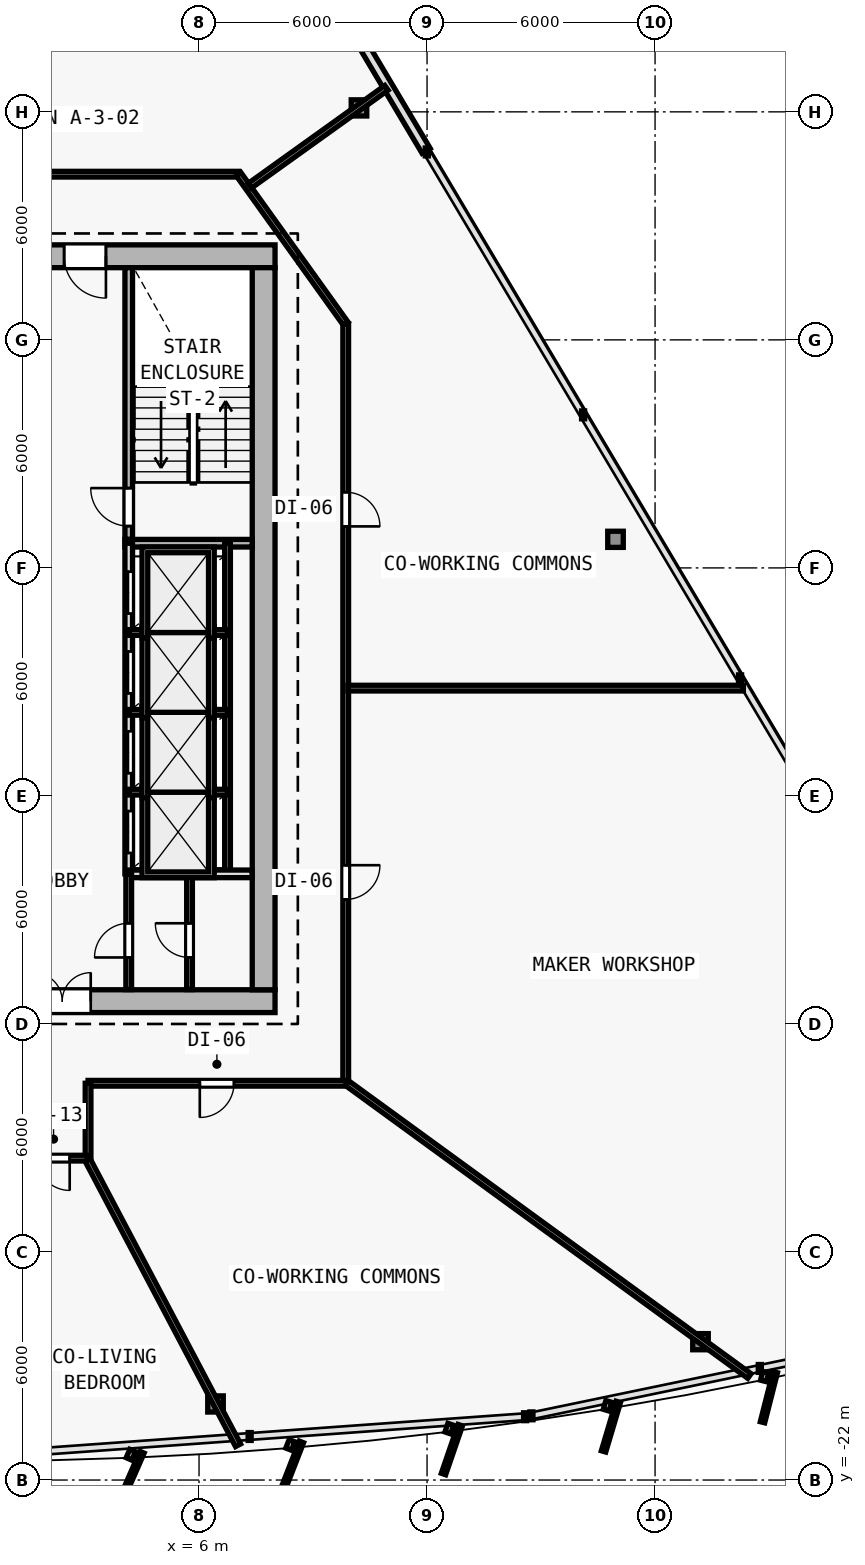
"""IFC4 building model, lengths in metres.
Left out: names, types, materials, properties, quantities, classifications, styles, units other than length and angle.
Written with IfcOpenShell. Run it as: python <this file> out.ifc"""

import sys

from ifc_helpers import new_model, si_unit, direction, frame, frame_2d, origin, origin_2d, place, context, subcontext, project, spatial, rectangle, i_section, extrude, element, fill, save


model = new_model("IFC4")
c1 = context("Model", 3, precision=1e-05, world=origin(), true_north=direction((0.0, 1.0)))
c2 = subcontext(c1, "Body", "Model", "MODEL_VIEW")
j1 = project(units=[si_unit("LENGTHUNIT", "METRE"), si_unit("PLANEANGLEUNIT", "RADIAN")], contexts=[c1])
p1 = place(None, origin())
s1 = spatial("IfcSite", under=j1, at=p1, CompositionType="ELEMENT")
p2 = place(p1, origin())
s2 = spatial("IfcBuilding", under=s1, at=p2, CompositionType="ELEMENT")
p3 = place(p2, frame((0.0, 0.0, 86.1)))
s3 = spatial("IfcBuildingStorey", under=s2, at=p3, CompositionType="ELEMENT", Elevation=86.1)
for number, where, z_axis, x_axis in (
    (1, (7.7, -9.4, 0.0), (0.0, 0.0, 1.0), (1.0, 0.0, 0.0)),
    (2, (7.7, 10.2, 0.0), (0.0, 0.0, 1.0), (1.0, 0.0, 0.0)),
    (3, (7.7, 0.4, 0.0), (0.0, 0.0, 1.0), (1.0, 0.0, 0.0)),
):
    element("IfcColumn", number, at=place(p3, frame(where, z_axis=z_axis, x_axis=x_axis)), inside=s3, PredefinedType="COLUMN", context=c2, shape_type="SweptSolid", body=[
        extrude(i_section(OverallWidth=0.409, OverallDepth=0.425, WebThickness=0.021, FlangeThickness=0.034, FilletRadius=0.015, at=origin_2d()), origin(), (0.0, 0.0, 1.0), 3.6),
    ])
p4 = place(p3, frame((6.433, -19.998, 0.005), z_axis=(-0.006865858153, 0.03521301508, 0.99935624457), x_axis=(-0.981516643497, -0.191376797284, 0.0)))
e4 = element("IfcColumn", 4, at=p4, inside=s3, PredefinedType="COLUMN", context=c2, shape_type="SweptSolid", body=[
    extrude(i_section(OverallWidth=0.409, OverallDepth=0.425, WebThickness=0.021, FlangeThickness=0.034, FilletRadius=0.015, at=origin_2d()), origin(), (0.0, 0.0, 1.0), 3.591),
])
p5 = place(p3, frame((19.195, -18.36, 0.005), z_axis=(-0.020594893987, 0.033509183946, 0.999226193078), x_axis=(-0.851954850327, -0.523615252838, 0.0)))
e5 = element("IfcColumn", 5, at=p5, inside=s3, PredefinedType="COLUMN", context=c2, shape_type="SweptSolid", body=[
    extrude(i_section(OverallWidth=0.409, OverallDepth=0.425, WebThickness=0.021, FlangeThickness=0.034, FilletRadius=0.015, at=origin_2d()), origin(), (0.0, 0.0, 1.0), 3.592),
])
p6 = place(p3, frame((16.959, 2.752, 0.005), z_axis=(-0.018906028715, 0.009589028952, 0.999775281052), x_axis=(-0.452339157861, -0.891845999187, 0.0)))
e6 = element("IfcColumn", 6, at=p6, inside=s3, PredefinedType="COLUMN", context=c2, shape_type="SweptSolid", body=[
    extrude(i_section(OverallWidth=0.409, OverallDepth=0.425, WebThickness=0.021, FlangeThickness=0.034, FilletRadius=0.015, at=origin_2d()), origin(), (0.0, 0.0, 1.0), 3.59),
])
p7 = place(p3, frame((10.209, 14.104, 0.005), z_axis=(-0.011699044583, -0.00258467264, 0.999928223336), x_axis=(0.215728093413, -0.976453475447, 0.0)))
e7 = element("IfcColumn", 7, at=p7, inside=s3, PredefinedType="COLUMN", context=c2, shape_type="SweptSolid", body=[
    extrude(i_section(OverallWidth=0.409, OverallDepth=0.425, WebThickness=0.021, FlangeThickness=0.034, FilletRadius=0.015, at=origin_2d()), origin(), (0.0, 0.0, 1.0), 3.589),
])
p8 = place(p3, frame((6.172, 22.734, 0.0), z_axis=(0.0, 0.0, 1.0), x_axis=(0.511105869751, -0.859517765905, 0.0)))
e8 = element("IfcWall", 8, at=p8, inside=s3, PredefinedType="SOLIDWALL", context=c2, shape_type="SweptSolid", body=[
    extrude(rectangle(XDim=11.357, YDim=0.25, at=frame_2d((5.678, 0.0))), origin(), (0.0, 0.0, 1.0), 3.35),
])
p9 = place(p8, frame((5.229, 0.0, 0.62)))
e9 = element("IfcOpeningElement", 9, at=p9, cuts=e8, PredefinedType="OPENING", context=c2, shape_type="SweptSolid", body=[
    extrude(rectangle(XDim=0.9, YDim=1.6, at=frame_2d((0.45, 0.8))), frame((0.0, 0.135, 0.0), z_axis=(0.0, -1.0, 0.0), x_axis=(1.0, 0.0, 0.0)), (0.0, 0.0, 1.0), 0.27),
])
p10 = place(p3, frame((-8.0, -9.4, 0.0), z_axis=(0.0, 0.0, 1.0), x_axis=(1.0, 0.0, 0.0)))
e10 = element("IfcWall", 10, at=p10, inside=s3, PredefinedType="SHEAR", context=c2, shape_type="SweptSolid", body=[
    extrude(rectangle(XDim=16.0, YDim=0.6, at=frame_2d((8.0, 0.0))), origin(), (0.0, 0.0, 1.0), 3.35),
])
p11 = place(p10, frame((9.65, 0.0, 0.0)))
e11 = element("IfcOpeningElement", 11, at=p11, cuts=e10, PredefinedType="OPENING", context=c2, shape_type="SweptSolid", body=[
    extrude(rectangle(XDim=1.5, YDim=2.2, at=frame_2d((0.75, 1.1))), frame((0.0, 0.31, 0.0), z_axis=(0.0, -1.0, 0.0), x_axis=(1.0, 0.0, 0.0)), (0.0, 0.0, 1.0), 0.62),
])
p12 = place(p3, frame((8.0, 10.2, 0.0), z_axis=(0.0, 0.0, 1.0), x_axis=(-1.0, 0.0, 0.0)))
e12 = element("IfcWall", 12, at=p12, inside=s3, PredefinedType="SHEAR", context=c2, shape_type="SweptSolid", body=[
    extrude(rectangle(XDim=16.0, YDim=0.6, at=frame_2d((8.0, 0.0))), origin(), (0.0, 0.0, 1.0), 3.35),
])
p13 = place(p12, frame((4.45, 0.0, 0.0)))
e13 = element("IfcOpeningElement", 13, at=p13, cuts=e12, PredefinedType="OPENING", context=c2, shape_type="SweptSolid", body=[
    extrude(rectangle(XDim=1.1, YDim=2.15, at=frame_2d((0.55, 1.075))), frame((0.0, 0.31, 0.0), z_axis=(0.0, -1.0, 0.0), x_axis=(1.0, 0.0, 0.0)), (0.0, 0.0, 1.0), 0.62),
])
p14 = place(p3, frame((7.7, 9.9, 0.0), z_axis=(0.0, 0.0, 1.0), x_axis=(0.0, -1.0, 0.0)))
e14 = element("IfcWall", 14, at=p14, inside=s3, PredefinedType="SHEAR", context=c2, shape_type="SweptSolid", body=[
    extrude(rectangle(XDim=19.0, YDim=0.6, at=frame_2d((9.5, 0.0))), origin(), (0.0, 0.0, 1.0), 3.35),
])
p15 = place(p3, frame((4.15, 2.75, 0.0), z_axis=(0.0, 0.0, 1.0), x_axis=(0.0, 1.0, 0.0)))
e15 = element("IfcWall", 15, at=p15, inside=s3, PredefinedType="SOLIDWALL", context=c2, shape_type="SweptSolid", body=[
    extrude(rectangle(XDim=7.15, YDim=0.2, at=frame_2d((3.575, 0.0))), origin(), (0.0, 0.0, 1.0), 3.35),
])
p16 = place(p15, frame((0.35, 0.0, 0.0)))
e16 = element("IfcOpeningElement", 16, at=p16, cuts=e15, PredefinedType="OPENING", context=c2, shape_type="SweptSolid", body=[
    extrude(rectangle(XDim=1.0, YDim=2.15, at=frame_2d((0.5, 1.075))), frame((0.0, 0.11, 0.0), z_axis=(0.0, -1.0, 0.0), x_axis=(1.0, 0.0, 0.0)), (0.0, 0.0, 1.0), 0.22),
])
p17 = place(p3, frame((4.05, 2.65, 0.0), z_axis=(0.0, 0.0, 1.0), x_axis=(1.0, 0.0, 0.0)))
e17 = element("IfcWall", 17, at=p17, inside=s3, PredefinedType="SOLIDWALL", context=c2, shape_type="SweptSolid", body=[
    extrude(rectangle(XDim=3.35, YDim=0.2, at=frame_2d((1.675, 0.0))), origin(), (0.0, 0.0, 1.0), 3.35),
])
p18 = place(p3, frame((4.15, -6.05, 0.0), z_axis=(0.0, 0.0, 1.0), x_axis=(0.0, 1.0, 0.0)))
e18 = element("IfcWall", 18, at=p18, inside=s3, PredefinedType="SOLIDWALL", context=c2, shape_type="SweptSolid", body=[
    extrude(rectangle(XDim=8.7, YDim=0.2, at=frame_2d((4.35, 0.0))), origin(), (0.0, 0.0, 1.0), 3.35),
])
p19 = place(p18, frame((0.55, 0.0, 0.0)))
e19 = element("IfcOpeningElement", 19, at=p19, cuts=e18, PredefinedType="OPENING", context=c2, shape_type="SweptSolid", body=[
    extrude(rectangle(XDim=1.1, YDim=2.15, at=frame_2d((0.55, 1.075))), frame((0.0, 0.11, 0.0), z_axis=(0.0, -1.0, 0.0), x_axis=(1.0, 0.0, 0.0)), (0.0, 0.0, 1.0), 0.22),
])
p20 = place(p18, frame((2.65, 0.0, 0.0)))
e20 = element("IfcOpeningElement", 20, at=p20, cuts=e18, PredefinedType="OPENING", context=c2, shape_type="SweptSolid", body=[
    extrude(rectangle(XDim=1.1, YDim=2.15, at=frame_2d((0.55, 1.075))), frame((0.0, 0.11, 0.0), z_axis=(0.0, -1.0, 0.0), x_axis=(1.0, 0.0, 0.0)), (0.0, 0.0, 1.0), 0.22),
])
p21 = place(p18, frame((4.75, 0.0, 0.0)))
e21 = element("IfcOpeningElement", 21, at=p21, cuts=e18, PredefinedType="OPENING", context=c2, shape_type="SweptSolid", body=[
    extrude(rectangle(XDim=1.1, YDim=2.15, at=frame_2d((0.55, 1.075))), frame((0.0, 0.11, 0.0), z_axis=(0.0, -1.0, 0.0), x_axis=(1.0, 0.0, 0.0)), (0.0, 0.0, 1.0), 0.22),
])
p22 = place(p18, frame((6.85, 0.0, 0.0)))
e22 = element("IfcOpeningElement", 22, at=p22, cuts=e18, PredefinedType="OPENING", context=c2, shape_type="SweptSolid", body=[
    extrude(rectangle(XDim=1.1, YDim=2.15, at=frame_2d((0.55, 1.075))), frame((0.0, 0.11, 0.0), z_axis=(0.0, -1.0, 0.0), x_axis=(1.0, 0.0, 0.0)), (0.0, 0.0, 1.0), 0.22),
])
p23 = place(p3, frame((6.75, -6.05, 0.0), z_axis=(0.0, 0.0, 1.0), x_axis=(0.0, 1.0, 0.0)))
e23 = element("IfcWall", 23, at=p23, inside=s3, PredefinedType="PARTITIONING", context=c2, shape_type="SweptSolid", body=[
    extrude(rectangle(XDim=8.7, YDim=0.15, at=frame_2d((4.35, 0.0))), origin(), (0.0, 0.0, 1.0), 3.35),
])
for number, where, z_axis, x_axis in (
    (24, (4.15, -3.9, 0.0), (0.0, 0.0, 1.0), (1.0, 0.0, 0.0)),
    (25, (4.15, -1.8, 0.0), (0.0, 0.0, 1.0), (1.0, 0.0, 0.0)),
    (26, (4.15, 0.3, 0.0), (0.0, 0.0, 1.0), (1.0, 0.0, 0.0)),
):
    element("IfcWall", number, at=place(p3, frame(where, z_axis=z_axis, x_axis=x_axis)), inside=s3, PredefinedType="PARTITIONING", context=c2, shape_type="SweptSolid", body=[
        extrude(rectangle(XDim=2.6, YDim=0.15, at=frame_2d((1.3, 0.0))), origin(), (0.0, 0.0, 1.0), 3.35),
    ])
p24 = place(p3, frame((4.15, -6.05, 0.0), z_axis=(0.0, 0.0, 1.0), x_axis=(1.0, 0.0, 0.0)))
e27 = element("IfcWall", 27, at=p24, inside=s3, PredefinedType="SOLIDWALL", context=c2, shape_type="SweptSolid", body=[
    extrude(rectangle(XDim=3.245, YDim=0.2, at=frame_2d((1.623, 0.0))), origin(), (0.0, 0.0, 1.0), 3.35),
])
p25 = place(p3, frame((4.15, -9.095, 0.0), z_axis=(0.0, 0.0, 1.0), x_axis=(0.0, 1.0, 0.0)))
e28 = element("IfcWall", 28, at=p25, inside=s3, PredefinedType="PARTITIONING", context=c2, shape_type="SweptSolid", body=[
    extrude(rectangle(XDim=3.045, YDim=0.15, at=frame_2d((1.522, 0.0))), origin(), (0.0, 0.0, 1.0), 3.35),
])
p26 = place(p25, frame((0.845, 0.0, 0.0)))
e29 = element("IfcOpeningElement", 29, at=p26, cuts=e28, PredefinedType="OPENING", context=c2, shape_type="SweptSolid", body=[
    extrude(rectangle(XDim=0.9, YDim=2.1, at=frame_2d((0.45, 1.05))), frame((0.0, 0.085, 0.0), z_axis=(0.0, -1.0, 0.0), x_axis=(1.0, 0.0, 0.0)), (0.0, 0.0, 1.0), 0.17),
])
p27 = place(p3, frame((5.75, -9.095, 0.0), z_axis=(0.0, 0.0, 1.0), x_axis=(0.0, 1.0, 0.0)))
e30 = element("IfcWall", 30, at=p27, inside=s3, PredefinedType="PARTITIONING", context=c2, shape_type="SweptSolid", body=[
    extrude(rectangle(XDim=3.045, YDim=0.15, at=frame_2d((1.522, 0.0))), origin(), (0.0, 0.0, 1.0), 3.35),
])
p28 = place(p27, frame((0.845, 0.0, 0.0)))
e31 = element("IfcOpeningElement", 31, at=p28, cuts=e30, PredefinedType="OPENING", context=c2, shape_type="SweptSolid", body=[
    extrude(rectangle(XDim=0.9, YDim=2.1, at=frame_2d((0.45, 1.05))), frame((0.0, 0.085, 0.0), z_axis=(0.0, -1.0, 0.0), x_axis=(1.0, 0.0, 0.0)), (0.0, 0.0, 1.0), 0.17),
])
p29 = place(p3, frame((-7.041, 12.36, 0.0), z_axis=(0.0, 0.0, 1.0), x_axis=(1.0, 0.0, 0.0)))
e32 = element("IfcWall", 32, at=p29, inside=s3, PredefinedType="PARTITIONING", context=c2, shape_type="SweptSolid", body=[
    extrude(rectangle(XDim=14.082, YDim=0.15, at=frame_2d((7.041, 0.0))), origin(), (0.0, 0.0, 1.0), 3.35),
])
p30 = place(p29, frame((6.591, 0.0, 0.0)))
e33 = element("IfcOpeningElement", 33, at=p30, cuts=e32, PredefinedType="OPENING", context=c2, shape_type="SweptSolid", body=[
    extrude(rectangle(XDim=0.9, YDim=2.1, at=frame_2d((0.45, 1.05))), frame((0.0, 0.085, 0.0), z_axis=(0.0, -1.0, 0.0), x_axis=(1.0, 0.0, 0.0)), (0.0, 0.0, 1.0), 0.17),
])
p31 = place(p3, frame((7.041, 12.36, 0.0), z_axis=(0.0, 0.0, 1.0), x_axis=(0.582449511476, -0.812866881218, 0.0)))
e34 = element("IfcWall", 34, at=p31, inside=s3, PredefinedType="PARTITIONING", context=c2, shape_type="SweptSolid", body=[
    extrude(rectangle(XDim=4.84, YDim=0.15, at=frame_2d((2.42, 0.0))), origin(), (0.0, 0.0, 1.0), 2.825),
])
p32 = place(p3, frame((9.86, 8.426, 0.0), z_axis=(0.0, 0.0, 1.0), x_axis=(0.0, -1.0, 0.0)))
e35 = element("IfcWall", 35, at=p32, inside=s3, PredefinedType="PARTITIONING", context=c2, shape_type="SweptSolid", body=[
    extrude(rectangle(XDim=19.986, YDim=0.15, at=frame_2d((9.993, 0.0))), origin(), (0.0, 0.0, 1.0), 2.609),
])
p33 = place(p32, frame((14.248, 0.0, 0.0)))
e36 = element("IfcOpeningElement", 36, at=p33, cuts=e35, PredefinedType="OPENING", context=c2, shape_type="SweptSolid", body=[
    extrude(rectangle(XDim=0.9, YDim=2.1, at=frame_2d((0.45, 1.05))), frame((0.0, 0.085, 0.0), z_axis=(0.0, -1.0, 0.0), x_axis=(1.0, 0.0, 0.0)), (0.0, 0.0, 1.0), 0.17),
])
p34 = place(p32, frame((4.434, 0.0, 0.0)))
e37 = element("IfcOpeningElement", 37, at=p34, cuts=e35, PredefinedType="OPENING", context=c2, shape_type="SweptSolid", body=[
    extrude(rectangle(XDim=0.9, YDim=2.1, at=frame_2d((0.45, 1.05))), frame((0.0, 0.085, 0.0), z_axis=(0.0, -1.0, 0.0), x_axis=(1.0, 0.0, 0.0)), (0.0, 0.0, 1.0), 0.17),
])
p35 = place(p3, frame((9.86, -11.56, 0.0), z_axis=(0.0, 0.0, 1.0), x_axis=(-1.0, 0.0, 0.0)))
e38 = element("IfcWall", 38, at=p35, inside=s3, PredefinedType="PARTITIONING", context=c2, shape_type="SweptSolid", body=[
    extrude(rectangle(XDim=6.78, YDim=0.15, at=frame_2d((3.39, 0.0))), origin(), (0.0, 0.0, 1.0), 2.725),
])
p36 = place(p35, frame((2.94, 0.0, 0.0)))
e39 = element("IfcOpeningElement", 39, at=p36, cuts=e38, PredefinedType="OPENING", context=c2, shape_type="SweptSolid", body=[
    extrude(rectangle(XDim=0.9, YDim=2.1, at=frame_2d((0.45, 1.05))), frame((0.0, 0.085, 0.0), z_axis=(0.0, -1.0, 0.0), x_axis=(1.0, 0.0, 0.0)), (0.0, 0.0, 1.0), 0.17),
])
p37 = place(p3, frame((3.08, -11.56, 0.0), z_axis=(0.0, 0.0, 1.0), x_axis=(0.0, -1.0, 0.0)))
e40 = element("IfcWall", 40, at=p37, inside=s3, PredefinedType="PARTITIONING", context=c2, shape_type="SweptSolid", body=[
    extrude(rectangle(XDim=1.97, YDim=0.15, at=frame_2d((0.985, 0.0))), origin(), (0.0, 0.0, 1.0), 2.725),
])
p38 = place(p3, frame((3.08, -13.53, 0.0), z_axis=(0.0, 0.0, 1.0), x_axis=(-1.0, 0.0, 0.0)))
e41 = element("IfcWall", 41, at=p38, inside=s3, PredefinedType="PARTITIONING", context=c2, shape_type="SweptSolid", body=[
    extrude(rectangle(XDim=6.16, YDim=0.15, at=frame_2d((3.08, 0.0))), origin(), (0.0, 0.0, 1.0), 2.725),
])
p39 = place(p38, frame((4.487, 0.0, 0.0)))
e42 = element("IfcOpeningElement", 42, at=p39, cuts=e41, PredefinedType="OPENING", context=c2, shape_type="SweptSolid", body=[
    extrude(rectangle(XDim=0.9, YDim=2.1, at=frame_2d((0.45, 1.05))), frame((0.0, 0.085, 0.0), z_axis=(0.0, -1.0, 0.0), x_axis=(1.0, 0.0, 0.0)), (0.0, 0.0, 1.0), 0.17),
])
p40 = place(p38, frame((2.38, 0.0, 0.0)))
e43 = element("IfcOpeningElement", 43, at=p40, cuts=e41, PredefinedType="OPENING", context=c2, shape_type="SweptSolid", body=[
    extrude(rectangle(XDim=0.9, YDim=2.1, at=frame_2d((0.45, 1.05))), frame((0.0, 0.085, 0.0), z_axis=(0.0, -1.0, 0.0), x_axis=(1.0, 0.0, 0.0)), (0.0, 0.0, 1.0), 0.17),
])
p41 = place(p38, frame((0.483, 0.0, 0.0)))
e44 = element("IfcOpeningElement", 44, at=p41, cuts=e41, PredefinedType="OPENING", context=c2, shape_type="SweptSolid", body=[
    extrude(rectangle(XDim=0.85, YDim=2.1, at=frame_2d((0.425, 1.05))), frame((0.0, 0.085, 0.0), z_axis=(0.0, -1.0, 0.0), x_axis=(1.0, 0.0, 0.0)), (0.0, 0.0, 1.0), 0.17),
])
p42 = place(p3, frame((3.066, -13.573, 0.0), z_axis=(0.0, 0.0, 1.0), x_axis=(0.4664962743, -0.884523163102, 0.0)))
e45 = element("IfcWall", 45, at=p42, inside=s3, PredefinedType="PARTITIONING", context=c2, shape_type="SweptSolid", body=[
    extrude(rectangle(XDim=8.492, YDim=0.15, at=frame_2d((4.246, 0.0))), origin(), (0.0, 0.0, 1.0), 2.725),
])
p43 = place(p3, frame((9.896, -11.558, 0.0), z_axis=(0.0, 0.0, 1.0), x_axis=(0.808494137529, -0.588504230726, 0.0)))
e46 = element("IfcWall", 46, at=p43, inside=s3, PredefinedType="PARTITIONING", context=c2, shape_type="SweptSolid", body=[
    extrude(rectangle(XDim=13.094, YDim=0.15, at=frame_2d((6.547, 0.0))), origin(), (0.0, 0.0, 1.0), 2.725),
])
p44 = place(p3, frame((7.334, 12.054, 0.0), z_axis=(0.0, 0.0, 1.0), x_axis=(0.812882849954, 0.582427224853, 0.0)))
e47 = element("IfcWall", 47, at=p44, inside=s3, PredefinedType="PARTITIONING", context=c2, shape_type="SweptSolid", body=[
    extrude(rectangle(XDim=4.426, YDim=0.15, at=frame_2d((2.213, 0.0))), origin(), (0.0, 0.0, 1.0), 2.835),
])
p45 = place(p3, frame((9.92, -1.163, 0.0), z_axis=(0.0, 0.0, 1.0), x_axis=(1.0, 0.0, 0.0)))
e48 = element("IfcWall", 48, at=p45, inside=s3, PredefinedType="PARTITIONING", context=c2, shape_type="SweptSolid", body=[
    extrude(rectangle(XDim=10.404, YDim=0.15, at=frame_2d((5.202, 0.0))), origin(), (0.0, 0.0, 1.0), 2.775),
])
p46 = place(p11, origin())
e49 = element("IfcDoor", 49, at=p46, inside=s3, OperationType="DOUBLE_DOOR_SINGLE_SWING", PredefinedType="DOOR", context=c2, shape_type="SweptSolid", body=[
    extrude(rectangle(XDim=1.5, YDim=2.2, at=frame_2d((0.75, 1.1))), frame((0.0, 0.025, 0.0), z_axis=(0.0, -1.0, 0.0), x_axis=(1.0, 0.0, 0.0)), (0.0, 0.0, 1.0), 0.05),
])
fill(e11, e49)
p47 = place(p13, origin())
e50 = element("IfcDoor", 50, at=p47, inside=s3, OperationType="SINGLE_SWING_LEFT", PredefinedType="DOOR", context=c2, shape_type="SweptSolid", body=[
    extrude(rectangle(XDim=1.1, YDim=2.15, at=frame_2d((0.55, 1.075))), frame((0.0, 0.025, 0.0), z_axis=(0.0, -1.0, 0.0), x_axis=(1.0, 0.0, 0.0)), (0.0, 0.0, 1.0), 0.05),
])
fill(e13, e50)
p48 = place(p16, origin())
e51 = element("IfcDoor", 51, at=p48, inside=s3, OperationType="SINGLE_SWING_RIGHT", PredefinedType="DOOR", context=c2, shape_type="SweptSolid", body=[
    extrude(rectangle(XDim=1.0, YDim=2.15, at=frame_2d((0.5, 1.075))), frame((0.0, 0.025, 0.0), z_axis=(0.0, -1.0, 0.0), x_axis=(1.0, 0.0, 0.0)), (0.0, 0.0, 1.0), 0.05),
])
fill(e16, e51)
p49 = place(p19, origin())
e52 = element("IfcDoor", 52, at=p49, inside=s3, OperationType="DOUBLE_DOOR_SLIDING", PredefinedType="DOOR", context=c2, shape_type="SweptSolid", body=[
    extrude(rectangle(XDim=1.1, YDim=2.15, at=frame_2d((0.55, 1.075))), frame((0.0, 0.025, 0.0), z_axis=(0.0, -1.0, 0.0), x_axis=(1.0, 0.0, 0.0)), (0.0, 0.0, 1.0), 0.05),
])
fill(e19, e52)
p50 = place(p20, origin())
e53 = element("IfcDoor", 53, at=p50, inside=s3, OperationType="DOUBLE_DOOR_SLIDING", PredefinedType="DOOR", context=c2, shape_type="SweptSolid", body=[
    extrude(rectangle(XDim=1.1, YDim=2.15, at=frame_2d((0.55, 1.075))), frame((0.0, 0.025, 0.0), z_axis=(0.0, -1.0, 0.0), x_axis=(1.0, 0.0, 0.0)), (0.0, 0.0, 1.0), 0.05),
])
fill(e20, e53)
p51 = place(p21, origin())
e54 = element("IfcDoor", 54, at=p51, inside=s3, OperationType="DOUBLE_DOOR_SLIDING", PredefinedType="DOOR", context=c2, shape_type="SweptSolid", body=[
    extrude(rectangle(XDim=1.1, YDim=2.15, at=frame_2d((0.55, 1.075))), frame((0.0, 0.025, 0.0), z_axis=(0.0, -1.0, 0.0), x_axis=(1.0, 0.0, 0.0)), (0.0, 0.0, 1.0), 0.05),
])
fill(e21, e54)
p52 = place(p22, origin())
e55 = element("IfcDoor", 55, at=p52, inside=s3, OperationType="DOUBLE_DOOR_SLIDING", PredefinedType="DOOR", context=c2, shape_type="SweptSolid", body=[
    extrude(rectangle(XDim=1.1, YDim=2.15, at=frame_2d((0.55, 1.075))), frame((0.0, 0.025, 0.0), z_axis=(0.0, -1.0, 0.0), x_axis=(1.0, 0.0, 0.0)), (0.0, 0.0, 1.0), 0.05),
])
fill(e22, e55)
p53 = place(p26, origin())
e56 = element("IfcDoor", 56, at=p53, inside=s3, OperationType="SINGLE_SWING_LEFT", PredefinedType="DOOR", context=c2, shape_type="SweptSolid", body=[
    extrude(rectangle(XDim=0.9, YDim=2.1, at=frame_2d((0.45, 1.05))), frame((0.0, 0.025, 0.0), z_axis=(0.0, -1.0, 0.0), x_axis=(1.0, 0.0, 0.0)), (0.0, 0.0, 1.0), 0.05),
])
fill(e29, e56)
p54 = place(p28, origin())
e57 = element("IfcDoor", 57, at=p54, inside=s3, OperationType="SINGLE_SWING_RIGHT", PredefinedType="DOOR", context=c2, shape_type="SweptSolid", body=[
    extrude(rectangle(XDim=0.9, YDim=2.1, at=frame_2d((0.45, 1.05))), frame((0.0, 0.025, 0.0), z_axis=(0.0, -1.0, 0.0), x_axis=(1.0, 0.0, 0.0)), (0.0, 0.0, 1.0), 0.05),
])
fill(e31, e57)
p55 = place(p41, origin())
e58 = element("IfcDoor", 58, at=p55, inside=s3, OperationType="SINGLE_SWING_LEFT", PredefinedType="DOOR", context=c2, shape_type="SweptSolid", body=[
    extrude(rectangle(XDim=0.85, YDim=2.1, at=frame_2d((0.425, 1.05))), frame((0.0, 0.025, 0.0), z_axis=(0.0, -1.0, 0.0), x_axis=(1.0, 0.0, 0.0)), (0.0, 0.0, 1.0), 0.05),
])
fill(e44, e58)
p56 = place(p36, origin())
e59 = element("IfcDoor", 59, at=p56, inside=s3, OperationType="SINGLE_SWING_RIGHT", PredefinedType="DOOR", context=c2, shape_type="SweptSolid", body=[
    extrude(rectangle(XDim=0.9, YDim=2.1, at=frame_2d((0.45, 1.05))), frame((0.0, 0.025, 0.0), z_axis=(0.0, -1.0, 0.0), x_axis=(1.0, 0.0, 0.0)), (0.0, 0.0, 1.0), 0.05),
])
fill(e39, e59)
p57 = place(p33, origin())
e60 = element("IfcDoor", 60, at=p57, inside=s3, OperationType="SINGLE_SWING_LEFT", PredefinedType="DOOR", context=c2, shape_type="SweptSolid", body=[
    extrude(rectangle(XDim=0.9, YDim=2.1, at=frame_2d((0.45, 1.05))), frame((0.0, 0.025, 0.0), z_axis=(0.0, -1.0, 0.0), x_axis=(1.0, 0.0, 0.0)), (0.0, 0.0, 1.0), 0.05),
])
fill(e36, e60)
p58 = place(p34, origin())
e61 = element("IfcDoor", 61, at=p58, inside=s3, OperationType="SINGLE_SWING_RIGHT", PredefinedType="DOOR", context=c2, shape_type="SweptSolid", body=[
    extrude(rectangle(XDim=0.9, YDim=2.1, at=frame_2d((0.45, 1.05))), frame((0.0, 0.025, 0.0), z_axis=(0.0, -1.0, 0.0), x_axis=(1.0, 0.0, 0.0)), (0.0, 0.0, 1.0), 0.05),
])
fill(e37, e61)
save(model, sys.argv[1])
